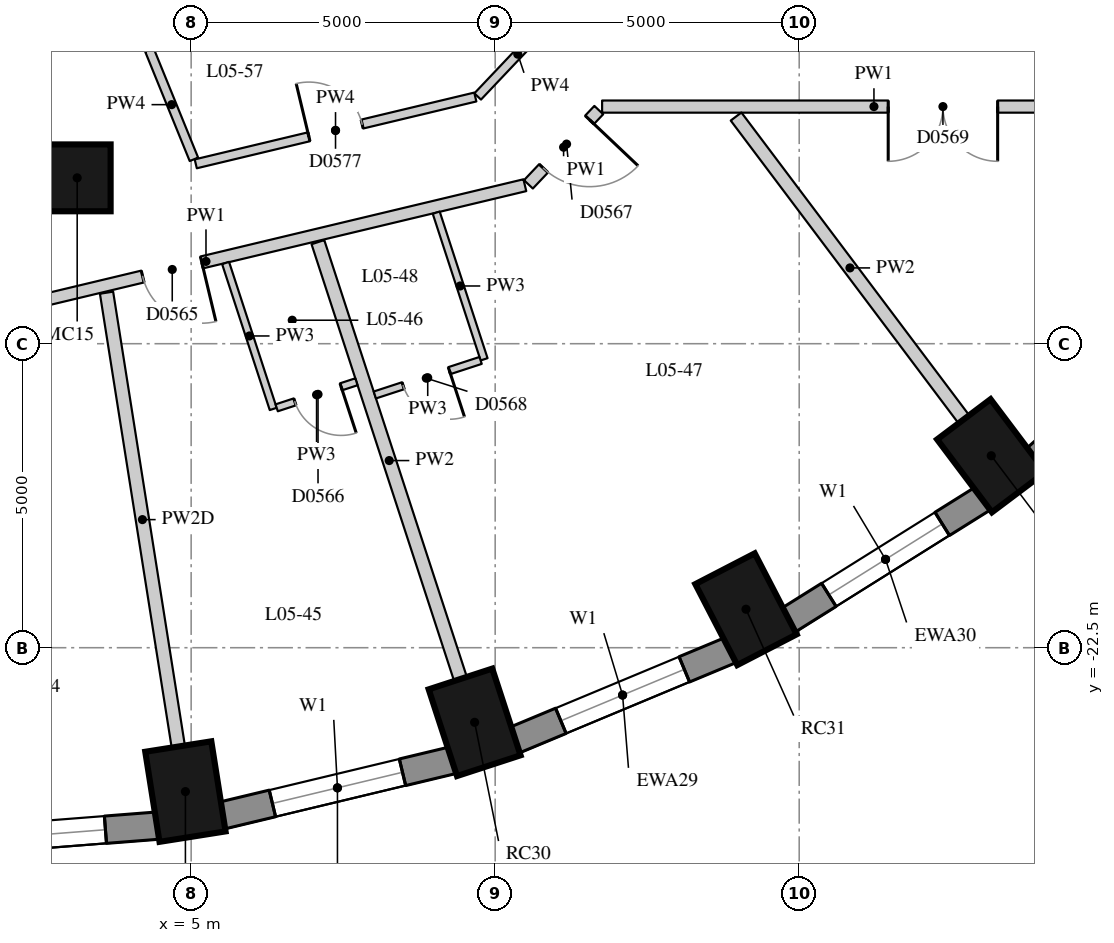
"""IFC4 building model, lengths in metres.
Left out: names, types, materials, properties, quantities, classifications, styles, units other than length and angle.
Written with IfcOpenShell. Run it as: python <this file> out.ifc"""

import sys

from ifc_helpers import new_model, si_unit, direction, frame, frame_2d, origin, origin_2d, place, context, subcontext, project, spatial, rectangle, extrude, element, fill, save


model = new_model("IFC4")
c1 = context("Model", 3, precision=1e-05, world=origin(), true_north=direction((0.0, 1.0)))
c2 = subcontext(c1, "Body", "Model", "MODEL_VIEW")
j1 = project(units=[si_unit("LENGTHUNIT", "METRE"), si_unit("PLANEANGLEUNIT", "RADIAN")], contexts=[c1])
p1 = place(None, origin())
s1 = spatial("IfcSite", under=j1, at=p1, CompositionType="ELEMENT")
p2 = place(p1, origin())
s2 = spatial("IfcBuilding", under=s1, at=p2, CompositionType="ELEMENT")
p3 = place(p2, frame((0.0, 0.0, 25.0)))
s3 = spatial("IfcBuildingStorey", under=s2, at=p3, CompositionType="ELEMENT", Elevation=25.0)
for number, where, z_axis, x_axis in (
    (1, (4.906, -24.866, 0.0), (0.0, 0.0, 1.0), (0.156, -0.988, 0.0)),
    (2, (9.662, -23.727, 0.0), (0.0, 0.0, 1.0), (0.31, -0.951, 0.0)),
    (3, (14.125, -21.867, 0.0), (0.0, 0.0, 1.0), (0.46, -0.888, 0.0)),
    (4, (18.159, -19.343, 0.0), (0.0, 0.0, 1.0), (0.601, -0.799, 0.0)),
):
    element("IfcColumn", number, at=place(p3, frame(where, z_axis=z_axis, x_axis=x_axis)), inside=s3, PredefinedType="COLUMN", context=c2, shape_type="SweptSolid", body=[
        extrude(rectangle(XDim=1.5, YDim=1.1, at=origin_2d()), origin(), (0.0, 0.0, 1.0), 3.3),
    ])
p4 = place(p3, frame((3.126, -14.772, 0.0), z_axis=(0.0, 0.0, 1.0), x_axis=(1.0, 0.0, 0.0)))
e5 = element("IfcColumn", 5, at=p4, inside=s3, PredefinedType="COLUMN", context=c2, shape_type="SweptSolid", body=[
    extrude(rectangle(XDim=1.1, YDim=1.1, at=origin_2d()), origin(), (0.0, 0.0, 1.0), 3.3),
])
p5 = place(p3, frame((0.53, -25.733, 0.0), z_axis=(0.0, 0.0, 1.0), x_axis=(0.996955972145, 0.077966592873, 0.0)))
e6 = element("IfcWall", 6, at=p5, inside=s3, PredefinedType="SOLIDWALL", context=c2, shape_type="SweptSolid", body=[
    extrude(rectangle(XDim=3.939, YDim=0.45, at=frame_2d((1.97, 0.0))), origin(), (0.0, 0.0, 1.0), 3.02),
])
p6 = place(p5, frame((0.87, 0.0, 0.4)))
e7 = element("IfcOpeningElement", 7, at=p6, cuts=e6, PredefinedType="OPENING", context=c2, shape_type="SweptSolid", body=[
    extrude(rectangle(XDim=2.2, YDim=1.75, at=frame_2d((1.1, 0.875))), frame((0.0, 0.235, 0.0), z_axis=(0.0, -1.0, 0.0), x_axis=(1.0, 0.0, 0.0)), (0.0, 0.0, 1.0), 0.47),
])
p7 = place(p3, frame((5.504, -25.26, 0.0), z_axis=(0.0, 0.0, 1.0), x_axis=(0.972496561493, 0.232917233979, 0.0)))
e8 = element("IfcWall", 8, at=p7, inside=s3, PredefinedType="SOLIDWALL", context=c2, shape_type="SweptSolid", body=[
    extrude(rectangle(XDim=3.911, YDim=0.45, at=frame_2d((1.956, 0.0))), origin(), (0.0, 0.0, 1.0), 3.02),
])
p8 = place(p7, frame((0.855, 0.0, 0.4)))
e9 = element("IfcOpeningElement", 9, at=p8, cuts=e8, PredefinedType="OPENING", context=c2, shape_type="SweptSolid", body=[
    extrude(rectangle(XDim=2.2, YDim=1.75, at=frame_2d((1.1, 0.875))), frame((0.0, 0.235, 0.0), z_axis=(0.0, -1.0, 0.0), x_axis=(1.0, 0.0, 0.0)), (0.0, 0.0, 1.0), 0.47),
])
p9 = place(p3, frame((10.315, -24.021, 0.0), z_axis=(0.0, 0.0, 1.0), x_axis=(0.923031964282, 0.384723267966, 0.0)))
e10 = element("IfcWall", 10, at=p9, inside=s3, PredefinedType="SOLIDWALL", context=c2, shape_type="SweptSolid", body=[
    extrude(rectangle(XDim=3.856, YDim=0.45, at=frame_2d((1.928, 0.0))), origin(), (0.0, 0.0, 1.0), 3.02),
])
p10 = place(p9, frame((0.828, 0.0, 0.4)))
e11 = element("IfcOpeningElement", 11, at=p10, cuts=e10, PredefinedType="OPENING", context=c2, shape_type="SweptSolid", body=[
    extrude(rectangle(XDim=2.2, YDim=1.75, at=frame_2d((1.1, 0.875))), frame((0.0, 0.235, 0.0), z_axis=(0.0, -1.0, 0.0), x_axis=(1.0, 0.0, 0.0)), (0.0, 0.0, 1.0), 0.47),
])
p11 = place(p3, frame((14.817, -22.051, 0.0), z_axis=(0.0, 0.0, 1.0), x_axis=(0.847635480093, 0.530579016629, 0.0)))
e12 = element("IfcWall", 12, at=p11, inside=s3, PredefinedType="SOLIDWALL", context=c2, shape_type="SweptSolid", body=[
    extrude(rectangle(XDim=3.782, YDim=0.45, at=frame_2d((1.891, 0.0))), origin(), (0.0, 0.0, 1.0), 3.02),
])
p12 = place(p11, frame((0.791, 0.0, 0.4)))
e13 = element("IfcOpeningElement", 13, at=p12, cuts=e12, PredefinedType="OPENING", context=c2, shape_type="SweptSolid", body=[
    extrude(rectangle(XDim=2.2, YDim=1.75, at=frame_2d((1.1, 0.875))), frame((0.0, 0.235, 0.0), z_axis=(0.0, -1.0, 0.0), x_axis=(1.0, 0.0, 0.0)), (0.0, 0.0, 1.0), 0.47),
])
p13 = place(p3, frame((18.871, -19.407, 0.0), z_axis=(0.0, 0.0, 1.0), x_axis=(0.745526233716, 0.66647628228, 0.0)))
e14 = element("IfcWall", 14, at=p13, inside=s3, PredefinedType="SOLIDWALL", context=c2, shape_type="SweptSolid", body=[
    extrude(rectangle(XDim=3.697, YDim=0.45, at=frame_2d((1.848, 0.0))), origin(), (0.0, 0.0, 1.0), 3.02),
])
p14 = place(p3, frame((20.7, -13.6, 0.0), z_axis=(0.0, 0.0, 1.0), x_axis=(-1.0, 0.0, 0.0)))
e15 = element("IfcWall", 15, at=p14, inside=s3, PredefinedType="PARTITIONING", context=c2, shape_type="SweptSolid", body=[
    extrude(rectangle(XDim=8.941, YDim=0.2, at=frame_2d((4.471, 0.0))), origin(), (0.0, 0.0, 1.0), 3.02),
])
p15 = place(p14, frame((2.436, 0.0, 0.0)))
e16 = element("IfcOpeningElement", 16, at=p15, cuts=e15, PredefinedType="OPENING", context=c2, shape_type="SweptSolid", body=[
    extrude(rectangle(XDim=1.8, YDim=2.1, at=frame_2d((0.9, 1.05))), frame((0.0, 0.11, 0.0), z_axis=(0.0, -1.0, 0.0), x_axis=(1.0, 0.0, 0.0)), (0.0, 0.0, 1.0), 0.22),
])
p16 = place(p3, frame((11.704, -13.658, 0.0), z_axis=(0.0, 0.0, 1.0), x_axis=(-0.687768795377, -0.725929806597, 0.0)))
e17 = element("IfcWall", 17, at=p16, inside=s3, PredefinedType="PARTITIONING", context=c2, shape_type="SweptSolid", body=[
    extrude(rectangle(XDim=1.683, YDim=0.2, at=frame_2d((0.841, 0.0))), origin(), (0.0, 0.0, 1.0), 3.02),
])
p17 = place(p16, frame((0.22, 0.0, 0.0)))
e18 = element("IfcOpeningElement", 18, at=p17, cuts=e17, PredefinedType="OPENING", context=c2, shape_type="SweptSolid", body=[
    extrude(rectangle(XDim=1.1, YDim=2.1, at=frame_2d((0.55, 1.05))), frame((0.0, 0.11, 0.0), z_axis=(0.0, -1.0, 0.0), x_axis=(1.0, 0.0, 0.0)), (0.0, 0.0, 1.0), 0.22),
])
p18 = place(p3, frame((10.488, -14.893, 0.0), z_axis=(0.0, 0.0, 1.0), x_axis=(-0.972603489924, -0.23247032367, 0.0)))
e19 = element("IfcWall", 19, at=p18, inside=s3, PredefinedType="PARTITIONING", context=c2, shape_type="SweptSolid", body=[
    extrude(rectangle(XDim=10.783, YDim=0.2, at=frame_2d((5.392, 0.0))), origin(), (0.0, 0.0, 1.0), 3.02),
])
p19 = place(p18, frame((8.59, 0.0, 0.0)))
e20 = element("IfcOpeningElement", 20, at=p19, cuts=e19, PredefinedType="OPENING", context=c2, shape_type="SweptSolid", body=[
    extrude(rectangle(XDim=0.9, YDim=2.1, at=frame_2d((0.45, 1.05))), frame((0.0, 0.11, 0.0), z_axis=(0.0, -1.0, 0.0), x_axis=(1.0, 0.0, 0.0)), (0.0, 0.0, 1.0), 0.22),
])
p20 = place(p18, frame((5.462, 0.0, 0.0)))
e21 = element("IfcOpeningElement", 21, at=p20, cuts=e19, PredefinedType="OPENING", context=c2, shape_type="SweptSolid", body=[
    extrude(rectangle(XDim=1.0, YDim=2.1, at=frame_2d((0.5, 1.05))), frame((0.0, 0.11, 0.0), z_axis=(0.0, -1.0, 0.0), x_axis=(1.0, 0.0, 0.0)), (0.0, 0.0, 1.0), 0.22),
])
p21 = place(p3, frame((11.03, -12.043, 0.0), z_axis=(0.0, 0.0, 1.0), x_axis=(-0.687734044261, -0.725962729322, 0.0)))
e22 = element("IfcWall", 22, at=p21, inside=s3, PredefinedType="PARTITIONING", context=c2, shape_type="SweptSolid", body=[
    extrude(rectangle(XDim=1.916, YDim=0.15, at=frame_2d((0.958, 0.0))), origin(), (0.0, 0.0, 1.0), 3.02),
])
p22 = place(p3, frame((9.673, -13.443, 0.0), z_axis=(0.0, 0.0, 1.0), x_axis=(-0.972603013932, -0.232472315103, 0.0)))
e23 = element("IfcWall", 23, at=p22, inside=s3, PredefinedType="PARTITIONING", context=c2, shape_type="SweptSolid", body=[
    extrude(rectangle(XDim=4.727, YDim=0.15, at=frame_2d((2.363, 0.0))), origin(), (0.0, 0.0, 1.0), 3.02),
])
p23 = place(p22, frame((1.914, 0.0, 0.0)))
e24 = element("IfcOpeningElement", 24, at=p23, cuts=e23, PredefinedType="OPENING", context=c2, shape_type="SweptSolid", body=[
    extrude(rectangle(XDim=0.9, YDim=2.1, at=frame_2d((0.45, 1.05))), frame((0.0, 0.085, 0.0), z_axis=(0.0, -1.0, 0.0), x_axis=(1.0, 0.0, 0.0)), (0.0, 0.0, 1.0), 0.17),
])
p24 = place(p3, frame((5.045, -14.468, 0.0), z_axis=(0.0, 0.0, 1.0), x_axis=(-0.376889538578, 0.926258212223, 0.0)))
e25 = element("IfcWall", 25, at=p24, inside=s3, PredefinedType="PARTITIONING", context=c2, shape_type="SweptSolid", body=[
    extrude(rectangle(XDim=1.942, YDim=0.15, at=frame_2d((0.971, 0.0))), origin(), (0.0, 0.0, 1.0), 3.02),
])
p25 = place(p3, frame((4.788, -24.125, 0.0), z_axis=(0.0, 0.0, 1.0), x_axis=(-0.156131781396, 0.987736233434, 0.0)))
e26 = element("IfcWall", 26, at=p25, inside=s3, PredefinedType="PARTITIONING", context=c2, shape_type="SweptSolid", body=[
    extrude(rectangle(XDim=7.557, YDim=0.22, at=frame_2d((3.779, 0.0))), origin(), (0.0, 0.0, 1.0), 2.47),
])
p26 = place(p3, frame((9.429, -23.014, 0.0), z_axis=(0.0, 0.0, 1.0), x_axis=(-0.310261176215, 0.950651356983, 0.0)))
e27 = element("IfcWall", 27, at=p26, inside=s3, PredefinedType="PARTITIONING", context=c2, shape_type="SweptSolid", body=[
    extrude(rectangle(XDim=7.557, YDim=0.22, at=frame_2d((3.779, 0.0))), origin(), (0.0, 0.0, 1.0), 3.02),
])
p27 = place(p3, frame((17.708, -18.743, 0.0), z_axis=(0.0, 0.0, 1.0), x_axis=(-0.601177883261, 0.799115231164, 0.0)))
e28 = element("IfcWall", 28, at=p27, inside=s3, PredefinedType="PARTITIONING", context=c2, shape_type="SweptSolid", body=[
    extrude(rectangle(XDim=6.231, YDim=0.22, at=frame_2d((3.116, 0.0))), origin(), (0.0, 0.0, 1.0), 3.02),
])
p28 = place(p3, frame((5.566, -16.172, 0.0), z_axis=(0.0, 0.0, 1.0), x_axis=(0.310159281599, -0.950684605975, 0.0)))
e29 = element("IfcWall", 29, at=p28, inside=s3, PredefinedType="PARTITIONING", context=c2, shape_type="SweptSolid", body=[
    extrude(rectangle(XDim=2.525, YDim=0.12, at=frame_2d((1.263, 0.0))), origin(), (0.0, 0.0, 1.0), 3.02),
])
p29 = place(p3, frame((9.03, -15.344, 0.0), z_axis=(0.0, 0.0, 1.0), x_axis=(0.310275804943, -0.950646582525, 0.0)))
e30 = element("IfcWall", 30, at=p29, inside=s3, PredefinedType="PARTITIONING", context=c2, shape_type="SweptSolid", body=[
    extrude(rectangle(XDim=2.538, YDim=0.12, at=frame_2d((1.269, 0.0))), origin(), (0.0, 0.0, 1.0), 3.02),
])
p30 = place(p3, frame((6.407, -18.554, 0.0), z_axis=(0.0, 0.0, 1.0), x_axis=(0.950628893115, 0.310329997864, 0.0)))
e31 = element("IfcWall", 31, at=p30, inside=s3, PredefinedType="PARTITIONING", context=c2, shape_type="SweptSolid", body=[
    extrude(rectangle(XDim=1.38, YDim=0.12, at=frame_2d((0.69, 0.0))), origin(), (0.0, 0.0, 1.0), 3.02),
])
p31 = place(p30, frame((0.315, 0.0, 0.0)))
e32 = element("IfcOpeningElement", 32, at=p31, cuts=e31, PredefinedType="OPENING", context=c2, shape_type="SweptSolid", body=[
    extrude(rectangle(XDim=0.8, YDim=2.1, at=frame_2d((0.4, 1.05))), frame((0.0, 0.07, 0.0), z_axis=(0.0, -1.0, 0.0), x_axis=(1.0, 0.0, 0.0)), (0.0, 0.0, 1.0), 0.14),
])
p32 = place(p3, frame((9.76, -17.775, 0.0), z_axis=(0.0, 0.0, 1.0), x_axis=(-0.950599833202, -0.310419002506, 0.0)))
e33 = element("IfcWall", 33, at=p32, inside=s3, PredefinedType="PARTITIONING", context=c2, shape_type="SweptSolid", body=[
    extrude(rectangle(XDim=1.83, YDim=0.12, at=frame_2d((0.915, 0.0))), origin(), (0.0, 0.0, 1.0), 3.02),
])
p33 = place(p32, frame((0.54, 0.0, 0.0)))
e34 = element("IfcOpeningElement", 34, at=p33, cuts=e33, PredefinedType="OPENING", context=c2, shape_type="SweptSolid", body=[
    extrude(rectangle(XDim=0.8, YDim=2.1, at=frame_2d((0.4, 1.05))), frame((0.0, 0.07, 0.0), z_axis=(0.0, -1.0, 0.0), x_axis=(1.0, 0.0, 0.0)), (0.0, 0.0, 1.0), 0.14),
])
p34 = place(p6, origin())
e35 = element("IfcWindow", 35, at=p34, inside=s3, PartitioningType="SINGLE_PANEL", PredefinedType="WINDOW", context=c2, shape_type="SweptSolid", body=[
    extrude(rectangle(XDim=2.2, YDim=1.75, at=frame_2d((1.1, 0.875))), frame((0.0, 0.035, 0.0), z_axis=(0.0, -1.0, 0.0), x_axis=(1.0, 0.0, 0.0)), (0.0, 0.0, 1.0), 0.06),
])
fill(e7, e35)
p35 = place(p8, origin())
e36 = element("IfcWindow", 36, at=p35, inside=s3, PartitioningType="SINGLE_PANEL", PredefinedType="WINDOW", context=c2, shape_type="SweptSolid", body=[
    extrude(rectangle(XDim=2.2, YDim=1.75, at=frame_2d((1.1, 0.875))), frame((0.0, 0.035, 0.0), z_axis=(0.0, -1.0, 0.0), x_axis=(1.0, 0.0, 0.0)), (0.0, 0.0, 1.0), 0.06),
])
fill(e9, e36)
p36 = place(p10, origin())
e37 = element("IfcWindow", 37, at=p36, inside=s3, PartitioningType="SINGLE_PANEL", PredefinedType="WINDOW", context=c2, shape_type="SweptSolid", body=[
    extrude(rectangle(XDim=2.2, YDim=1.75, at=frame_2d((1.1, 0.875))), frame((0.0, 0.035, 0.0), z_axis=(0.0, -1.0, 0.0), x_axis=(1.0, 0.0, 0.0)), (0.0, 0.0, 1.0), 0.06),
])
fill(e11, e37)
p37 = place(p12, origin())
e38 = element("IfcWindow", 38, at=p37, inside=s3, PartitioningType="SINGLE_PANEL", PredefinedType="WINDOW", context=c2, shape_type="SweptSolid", body=[
    extrude(rectangle(XDim=2.2, YDim=1.75, at=frame_2d((1.1, 0.875))), frame((0.0, 0.035, 0.0), z_axis=(0.0, -1.0, 0.0), x_axis=(1.0, 0.0, 0.0)), (0.0, 0.0, 1.0), 0.06),
])
fill(e13, e38)
p38 = place(p20, origin())
e39 = element("IfcDoor", 39, at=p38, inside=s3, OperationType="SINGLE_SWING_LEFT", PredefinedType="DOOR", context=c2, shape_type="SweptSolid", body=[
    extrude(rectangle(XDim=1.0, YDim=2.1, at=frame_2d((0.5, 1.05))), frame((0.0, 0.025, 0.0), z_axis=(0.0, -1.0, 0.0), x_axis=(1.0, 0.0, 0.0)), (0.0, 0.0, 1.0), 0.05),
])
fill(e21, e39)
p39 = place(p31, origin())
e40 = element("IfcDoor", 40, at=p39, inside=s3, OperationType="SINGLE_SWING_LEFT", PredefinedType="DOOR", context=c2, shape_type="SweptSolid", body=[
    extrude(rectangle(XDim=0.8, YDim=2.1, at=frame_2d((0.4, 1.05))), frame((0.0, 0.025, 0.0), z_axis=(0.0, -1.0, 0.0), x_axis=(1.0, 0.0, 0.0)), (0.0, 0.0, 1.0), 0.05),
])
fill(e32, e40)
p40 = place(p17, origin())
e41 = element("IfcDoor", 41, at=p40, inside=s3, OperationType="SINGLE_SWING_LEFT", PredefinedType="DOOR", context=c2, shape_type="SweptSolid", body=[
    extrude(rectangle(XDim=1.1, YDim=2.1, at=frame_2d((0.55, 1.05))), frame((0.0, 0.025, 0.0), z_axis=(0.0, -1.0, 0.0), x_axis=(1.0, 0.0, 0.0)), (0.0, 0.0, 1.0), 0.05),
])
fill(e18, e41)
p41 = place(p33, origin())
e42 = element("IfcDoor", 42, at=p41, inside=s3, OperationType="SINGLE_SWING_LEFT", PredefinedType="DOOR", context=c2, shape_type="SweptSolid", body=[
    extrude(rectangle(XDim=0.8, YDim=2.1, at=frame_2d((0.4, 1.05))), frame((0.0, 0.025, 0.0), z_axis=(0.0, -1.0, 0.0), x_axis=(1.0, 0.0, 0.0)), (0.0, 0.0, 1.0), 0.05),
])
fill(e34, e42)
p42 = place(p15, origin())
e43 = element("IfcDoor", 43, at=p42, inside=s3, OperationType="DOUBLE_DOOR_SINGLE_SWING", PredefinedType="DOOR", context=c2, shape_type="SweptSolid", body=[
    extrude(rectangle(XDim=1.8, YDim=2.1, at=frame_2d((0.9, 1.05))), frame((0.0, 0.025, 0.0), z_axis=(0.0, -1.0, 0.0), x_axis=(1.0, 0.0, 0.0)), (0.0, 0.0, 1.0), 0.05),
])
fill(e16, e43)
p43 = place(p23, origin())
e44 = element("IfcDoor", 44, at=p43, inside=s3, OperationType="SINGLE_SWING_LEFT", PredefinedType="DOOR", context=c2, shape_type="SweptSolid", body=[
    extrude(rectangle(XDim=0.9, YDim=2.1, at=frame_2d((0.45, 1.05))), frame((0.0, 0.025, 0.0), z_axis=(0.0, -1.0, 0.0), x_axis=(1.0, 0.0, 0.0)), (0.0, 0.0, 1.0), 0.05),
])
fill(e24, e44)
save(model, sys.argv[1])
